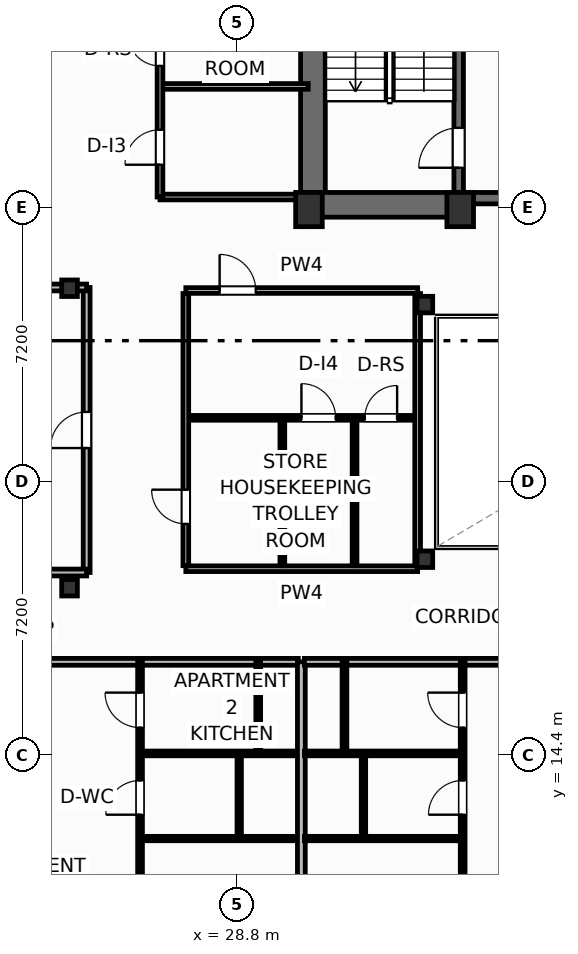
"""IFC4 building model, lengths in metres.
Left out: names, types, materials, properties, quantities, classifications, styles, units other than length and angle.
Written with IfcOpenShell. Run it as: python <this file> out.ifc"""

import sys

from ifc_helpers import new_model, si_unit, direction, frame, frame_2d, origin, origin_2d, place, context, subcontext, project, spatial, rectangle, i_section, extrude, element, fill, save


model = new_model("IFC4")
c1 = context("Model", 3, precision=1e-05, world=origin(), true_north=direction((0.0, 1.0)))
c2 = subcontext(c1, "Body", "Model", "MODEL_VIEW")
j1 = project(units=[si_unit("LENGTHUNIT", "METRE"), si_unit("PLANEANGLEUNIT", "RADIAN")], contexts=[c1])
p1 = place(None, origin())
s1 = spatial("IfcSite", under=j1, at=p1, CompositionType="ELEMENT")
p2 = place(p1, origin())
s2 = spatial("IfcBuilding", under=s1, at=p2, CompositionType="ELEMENT")
p3 = place(p2, frame((0.0, 0.0, 220.1)))
s3 = spatial("IfcBuildingStorey", under=s2, at=p3, CompositionType="ELEMENT", Elevation=220.1)
for number, where, z_axis, x_axis in (
    (1, (30.7, 28.75, 0.0), (0.0, 0.0, 1.0), (1.0, 0.0, 0.0)),
    (2, (34.68, 28.75, 0.0), (0.0, 0.0, 1.0), (1.0, 0.0, 0.0)),
):
    element("IfcColumn", number, at=place(p3, frame(where, z_axis=z_axis, x_axis=x_axis)), inside=s3, PredefinedType="COLUMN", context=c2, shape_type="SweptSolid", body=[
        extrude(rectangle(XDim=0.7, YDim=0.9, at=origin_2d()), origin(), (0.0, 0.0, 1.0), 3.7),
    ])
for number, where, z_axis, x_axis in (
    (3, (33.75, 19.55, 0.0), (0.0, 0.0, 1.0), (1.0, 0.0, 0.0)),
    (4, (33.75, 26.25, 0.0), (0.0, 0.0, 1.0), (1.0, 0.0, 0.0)),
    (5, (24.4, 18.8, 0.0), (0.0, 0.0, 1.0), (1.0, 0.0, 0.0)),
    (6, (24.4, 26.68, 0.0), (0.0, 0.0, 1.0), (1.0, 0.0, 0.0)),
):
    element("IfcColumn", number, at=place(p3, frame(where, z_axis=z_axis, x_axis=x_axis)), inside=s3, PredefinedType="COLUMN", context=c2, shape_type="SweptSolid", body=[
        extrude(i_section(OverallWidth=0.412, OverallDepth=0.435, WebThickness=0.036, FlangeThickness=0.057, FilletRadius=0.025, at=origin_2d()), origin(), (0.0, 0.0, 1.0), 3.7),
    ])
p4 = place(p3, frame((30.805, 29.2, 0.0), z_axis=(0.0, 0.0, 1.0), x_axis=(0.0, 1.0, 0.0)))
e7 = element("IfcWall", 7, at=p4, inside=s3, PredefinedType="SHEAR", context=c2, shape_type="SweptSolid", body=[
    extrude(rectangle(XDim=9.22, YDim=0.65, at=frame_2d((4.61, 0.0))), origin(), (0.0, 0.0, 1.0), 3.45),
])
p5 = place(p3, frame((30.48, 28.875, 0.0), z_axis=(0.0, 0.0, 1.0), x_axis=(1.0, 0.0, 0.0)))
e8 = element("IfcWall", 8, at=p5, inside=s3, PredefinedType="SHEAR", context=c2, shape_type="SweptSolid", body=[
    extrude(rectangle(XDim=4.32, YDim=0.65, at=frame_2d((2.16, 0.0))), origin(), (0.0, 0.0, 1.0), 3.45),
])
p6 = place(p3, frame((34.8, 29.05, 0.0), z_axis=(0.0, 0.0, 1.0), x_axis=(1.0, 0.0, 0.0)))
e9 = element("IfcWall", 9, at=p6, inside=s3, PredefinedType="SHEAR", context=c2, shape_type="SweptSolid", body=[
    extrude(rectangle(XDim=8.8, YDim=0.3, at=frame_2d((4.4, 0.0))), origin(), (0.0, 0.0, 1.0), 3.45),
])
p7 = place(p6, frame((0.95, 0.0, 0.0)))
e10 = element("IfcOpeningElement", 10, at=p7, cuts=e9, PredefinedType="OPENING", context=c2, shape_type="SweptSolid", body=[
    extrude(rectangle(XDim=1.1, YDim=2.15, at=frame_2d((0.55, 1.075))), frame((0.0, 0.16, 0.0), z_axis=(0.0, -1.0, 0.0), x_axis=(1.0, 0.0, 0.0)), (0.0, 0.0, 1.0), 0.32),
])
p8 = place(p6, frame((6.75, 0.0, 0.0)))
e11 = element("IfcOpeningElement", 11, at=p8, cuts=e9, PredefinedType="OPENING", context=c2, shape_type="SweptSolid", body=[
    extrude(rectangle(XDim=1.1, YDim=2.15, at=frame_2d((0.55, 1.075))), frame((0.0, 0.16, 0.0), z_axis=(0.0, -1.0, 0.0), x_axis=(1.0, 0.0, 0.0)), (0.0, 0.0, 1.0), 0.32),
])
p9 = place(p6, frame((4.45, 0.0, 0.0)))
e12 = element("IfcOpeningElement", 12, at=p9, cuts=e9, PredefinedType="OPENING", context=c2, shape_type="SweptSolid", body=[
    extrude(rectangle(XDim=0.95, YDim=2.15, at=frame_2d((0.475, 1.075))), frame((0.0, 0.16, 0.0), z_axis=(0.0, -1.0, 0.0), x_axis=(1.0, 0.0, 0.0)), (0.0, 0.0, 1.0), 0.32),
])
p10 = place(p3, frame((34.64, 29.2, 0.0), z_axis=(0.0, 0.0, 1.0), x_axis=(0.0, 1.0, 0.0)))
e13 = element("IfcWall", 13, at=p10, inside=s3, PredefinedType="SHEAR", context=c2, shape_type="SweptSolid", body=[
    extrude(rectangle(XDim=9.22, YDim=0.25, at=frame_2d((4.61, 0.0))), origin(), (0.0, 0.0, 1.0), 3.45),
])
p11 = place(p10, frame((0.65, 0.0, 0.0)))
e14 = element("IfcOpeningElement", 14, at=p11, cuts=e13, PredefinedType="OPENING", context=c2, shape_type="SweptSolid", body=[
    extrude(rectangle(XDim=1.05, YDim=2.15, at=frame_2d((0.525, 1.075))), frame((0.0, 0.135, 0.0), z_axis=(0.0, -1.0, 0.0), x_axis=(1.0, 0.0, 0.0)), (0.0, 0.0, 1.0), 0.27),
])
p12 = place(p3, frame((20.58, 16.85, 0.0), z_axis=(0.0, 0.0, 1.0), x_axis=(1.0, 0.0, 0.0)))
e15 = element("IfcWall", 15, at=p12, inside=s3, PredefinedType="PARTITIONING", context=c2, shape_type="SweptSolid", body=[
    extrude(rectangle(XDim=9.84, YDim=0.18, at=frame_2d((4.92, 0.0))), origin(), (0.0, 0.0, 1.0), 3.45),
])
p13 = place(p12, frame((2.302, 0.0, 0.0)))
e16 = element("IfcOpeningElement", 16, at=p13, cuts=e15, PredefinedType="OPENING", context=c2, shape_type="SweptSolid", body=[
    extrude(rectangle(XDim=1.0, YDim=2.2, at=frame_2d((0.5, 1.1))), frame((0.0, 0.1, 0.0), z_axis=(0.0, -1.0, 0.0), x_axis=(1.0, 0.0, 0.0)), (0.0, 0.0, 1.0), 0.2),
])
p14 = place(p3, frame((26.255, -1.478, 0.0), z_axis=(0.0, 0.0, 1.0), x_axis=(0.0, 1.0, 0.0)))
e17 = element("IfcWall", 17, at=p14, inside=s3, PredefinedType="PARTITIONING", context=c2, shape_type="SweptSolid", body=[
    extrude(rectangle(XDim=18.328, YDim=0.125, at=frame_2d((9.164, 0.0))), origin(), (0.0, 0.0, 1.0), 2.739),
])
p15 = place(p14, frame((6.319, 0.0, 0.0)))
e18 = element("IfcOpeningElement", 18, at=p15, cuts=e17, PredefinedType="OPENING", context=c2, shape_type="SweptSolid", body=[
    extrude(rectangle(XDim=0.92, YDim=2.05, at=frame_2d((0.46, 1.025))), frame((0.0, 0.073, 0.0), z_axis=(0.0, -1.0, 0.0), x_axis=(1.0, 0.0, 0.0)), (0.0, 0.0, 1.0), 0.145),
])
p16 = place(p14, frame((14.305, 0.0, 0.0)))
e19 = element("IfcOpeningElement", 19, at=p16, cuts=e17, PredefinedType="OPENING", context=c2, shape_type="SweptSolid", body=[
    extrude(rectangle(XDim=0.9, YDim=2.05, at=frame_2d((0.45, 1.025))), frame((0.0, 0.073, 0.0), z_axis=(0.0, -1.0, 0.0), x_axis=(1.0, 0.0, 0.0)), (0.0, 0.0, 1.0), 0.145),
])
p17 = place(p14, frame((16.598, 0.0, 0.0)))
e20 = element("IfcOpeningElement", 20, at=p17, cuts=e17, PredefinedType="OPENING", context=c2, shape_type="SweptSolid", body=[
    extrude(rectangle(XDim=0.92, YDim=2.05, at=frame_2d((0.46, 1.025))), frame((0.0, 0.073, 0.0), z_axis=(0.0, -1.0, 0.0), x_axis=(1.0, 0.0, 0.0)), (0.0, 0.0, 1.0), 0.145),
])
p18 = place(p3, frame((26.325, 14.44, 0.0), z_axis=(0.0, 0.0, 1.0), x_axis=(1.0, 0.0, 0.0)))
e21 = element("IfcWall", 21, at=p18, inside=s3, PredefinedType="PARTITIONING", context=c2, shape_type="SweptSolid", body=[
    extrude(rectangle(XDim=4.095, YDim=0.125, at=frame_2d((2.047, 0.0))), origin(), (0.0, 0.0, 1.0), 3.45),
])
p19 = place(p3, frame((26.325, 12.2, 0.0), z_axis=(0.0, 0.0, 1.0), x_axis=(1.0, 0.0, 0.0)))
e22 = element("IfcWall", 22, at=p19, inside=s3, PredefinedType="PARTITIONING", context=c2, shape_type="SweptSolid", body=[
    extrude(rectangle(XDim=4.095, YDim=0.115, at=frame_2d((2.047, 0.0))), origin(), (0.0, 0.0, 1.0), 3.45),
])
p20 = place(p3, frame((29.365, 14.44, 0.0), z_axis=(0.0, 0.0, 1.0), x_axis=(0.0, 1.0, 0.0)))
e23 = element("IfcWall", 23, at=p20, inside=s3, PredefinedType="PARTITIONING", context=c2, shape_type="SweptSolid", body=[
    extrude(rectangle(XDim=2.41, YDim=0.125, at=frame_2d((1.205, 0.0))), origin(), (0.0, 0.0, 1.0), 3.45),
])
p21 = place(p3, frame((28.865, 12.2, 0.0), z_axis=(0.0, 0.0, 1.0), x_axis=(0.0, 1.0, 0.0)))
e24 = element("IfcWall", 24, at=p21, inside=s3, PredefinedType="PARTITIONING", context=c2, shape_type="SweptSolid", body=[
    extrude(rectangle(XDim=2.24, YDim=0.115, at=frame_2d((1.12, 0.0))), origin(), (0.0, 0.0, 1.0), 3.45),
])
p22 = place(p3, frame((30.5, 0.129, 0.0), z_axis=(0.0, 0.0, 1.0), x_axis=(0.0, 1.0, 0.0)))
e25 = element("IfcWall", 25, at=p22, inside=s3, PredefinedType="PARTITIONING", context=c2, shape_type="SweptSolid", body=[
    extrude(rectangle(XDim=16.721, YDim=0.205, at=frame_2d((8.36, 0.0))), origin(), (0.0, 0.0, 1.0), 3.45),
])
p23 = place(p3, frame((30.58, 16.85, 0.0), z_axis=(0.0, 0.0, 1.0), x_axis=(1.0, 0.0, 0.0)))
e26 = element("IfcWall", 26, at=p23, inside=s3, PredefinedType="PARTITIONING", context=c2, shape_type="SweptSolid", body=[
    extrude(rectangle(XDim=9.84, YDim=0.18, at=frame_2d((4.92, 0.0))), origin(), (0.0, 0.0, 1.0), 3.45),
])
p24 = place(p23, frame((6.537, 0.0, 0.0)))
e27 = element("IfcOpeningElement", 27, at=p24, cuts=e26, PredefinedType="OPENING", context=c2, shape_type="SweptSolid", body=[
    extrude(rectangle(XDim=1.0, YDim=2.2, at=frame_2d((0.5, 1.1))), frame((0.0, 0.1, 0.0), z_axis=(0.0, -1.0, 0.0), x_axis=(1.0, 0.0, 0.0)), (0.0, 0.0, 1.0), 0.2),
])
p25 = place(p3, frame((34.745, 1.736, 0.0), z_axis=(0.0, 0.0, 1.0), x_axis=(0.0, 1.0, 0.0)))
e28 = element("IfcWall", 28, at=p25, inside=s3, PredefinedType="PARTITIONING", context=c2, shape_type="SweptSolid", body=[
    extrude(rectangle(XDim=15.114, YDim=0.125, at=frame_2d((7.557, 0.0))), origin(), (0.0, 0.0, 1.0), 2.739),
])
p26 = place(p25, frame((4.712, 0.0, 0.0)))
e29 = element("IfcOpeningElement", 29, at=p26, cuts=e28, PredefinedType="OPENING", context=c2, shape_type="SweptSolid", body=[
    extrude(rectangle(XDim=0.92, YDim=2.05, at=frame_2d((0.46, 1.025))), frame((0.0, 0.073, 0.0), z_axis=(0.0, -1.0, 0.0), x_axis=(1.0, 0.0, 0.0)), (0.0, 0.0, 1.0), 0.145),
])
p27 = place(p25, frame((11.091, 0.0, 0.0)))
e30 = element("IfcOpeningElement", 30, at=p27, cuts=e28, PredefinedType="OPENING", context=c2, shape_type="SweptSolid", body=[
    extrude(rectangle(XDim=0.9, YDim=2.05, at=frame_2d((0.45, 1.025))), frame((0.0, 0.073, 0.0), z_axis=(0.0, -1.0, 0.0), x_axis=(1.0, 0.0, 0.0)), (0.0, 0.0, 1.0), 0.145),
])
p28 = place(p25, frame((13.384, 0.0, 0.0)))
e31 = element("IfcOpeningElement", 31, at=p28, cuts=e28, PredefinedType="OPENING", context=c2, shape_type="SweptSolid", body=[
    extrude(rectangle(XDim=0.92, YDim=2.05, at=frame_2d((0.46, 1.025))), frame((0.0, 0.073, 0.0), z_axis=(0.0, -1.0, 0.0), x_axis=(1.0, 0.0, 0.0)), (0.0, 0.0, 1.0), 0.145),
])
p29 = place(p3, frame((30.58, 14.44, 0.0), z_axis=(0.0, 0.0, 1.0), x_axis=(1.0, 0.0, 0.0)))
e32 = element("IfcWall", 32, at=p29, inside=s3, PredefinedType="PARTITIONING", context=c2, shape_type="SweptSolid", body=[
    extrude(rectangle(XDim=4.095, YDim=0.125, at=frame_2d((2.047, 0.0))), origin(), (0.0, 0.0, 1.0), 3.45),
])
p30 = place(p3, frame((30.58, 12.2, 0.0), z_axis=(0.0, 0.0, 1.0), x_axis=(1.0, 0.0, 0.0)))
e33 = element("IfcWall", 33, at=p30, inside=s3, PredefinedType="PARTITIONING", context=c2, shape_type="SweptSolid", body=[
    extrude(rectangle(XDim=4.095, YDim=0.115, at=frame_2d((2.047, 0.0))), origin(), (0.0, 0.0, 1.0), 3.45),
])
p31 = place(p3, frame((31.635, 14.44, 0.0), z_axis=(0.0, 0.0, 1.0), x_axis=(0.0, 1.0, 0.0)))
e34 = element("IfcWall", 34, at=p31, inside=s3, PredefinedType="PARTITIONING", context=c2, shape_type="SweptSolid", body=[
    extrude(rectangle(XDim=2.41, YDim=0.125, at=frame_2d((1.205, 0.0))), origin(), (0.0, 0.0, 1.0), 3.45),
])
p32 = place(p3, frame((32.135, 12.2, 0.0), z_axis=(0.0, 0.0, 1.0), x_axis=(0.0, 1.0, 0.0)))
e35 = element("IfcWall", 35, at=p32, inside=s3, PredefinedType="PARTITIONING", context=c2, shape_type="SweptSolid", body=[
    extrude(rectangle(XDim=2.24, YDim=0.115, at=frame_2d((1.12, 0.0))), origin(), (0.0, 0.0, 1.0), 3.45),
])
p33 = place(p3, frame((24.85, 19.2, 0.0), z_axis=(0.0, 0.0, 1.0), x_axis=(0.0, 1.0, 0.0)))
e36 = element("IfcWall", 36, at=p33, inside=s3, PredefinedType="PARTITIONING", context=c2, shape_type="SweptSolid", body=[
    extrude(rectangle(XDim=7.5, YDim=0.18, at=frame_2d((3.75, 0.0))), origin(), (0.0, 0.0, 1.0), 3.45),
])
p34 = place(p33, frame((3.275, 0.0, 0.0)))
e37 = element("IfcOpeningElement", 37, at=p34, cuts=e36, PredefinedType="OPENING", context=c2, shape_type="SweptSolid", body=[
    extrude(rectangle(XDim=0.95, YDim=2.05, at=frame_2d((0.475, 1.025))), frame((0.0, 0.1, 0.0), z_axis=(0.0, -1.0, 0.0), x_axis=(1.0, 0.0, 0.0)), (0.0, 0.0, 1.0), 0.2),
])
p35 = place(p3, frame((6.306, 19.2, 0.0), z_axis=(0.0, 0.0, 1.0), x_axis=(1.0, 0.0, 0.0)))
e38 = element("IfcWall", 38, at=p35, inside=s3, PredefinedType="PARTITIONING", context=c2, shape_type="SweptSolid", body=[
    extrude(rectangle(XDim=18.544, YDim=0.18, at=frame_2d((9.272, 0.0))), origin(), (0.0, 0.0, 1.0), 3.45),
])
p36 = place(p3, frame((3.467, 26.7, 0.0), z_axis=(0.0, 0.0, 1.0), x_axis=(1.0, 0.0, 0.0)))
e39 = element("IfcWall", 39, at=p36, inside=s3, PredefinedType="PARTITIONING", context=c2, shape_type="SweptSolid", body=[
    extrude(rectangle(XDim=21.383, YDim=0.18, at=frame_2d((10.691, 0.0))), origin(), (0.0, 0.0, 1.0), 2.662),
])
p37 = place(p3, frame((27.46, 26.62, 0.0), z_axis=(0.0, 0.0, 1.0), x_axis=(1.0, 0.0, 0.0)))
e40 = element("IfcWall", 40, at=p37, inside=s3, PredefinedType="PARTITIONING", context=c2, shape_type="SweptSolid", body=[
    extrude(rectangle(XDim=6.1, YDim=0.15, at=frame_2d((3.05, 0.0))), origin(), (0.0, 0.0, 1.0), 2.662),
])
p38 = place(p37, frame((0.89, 0.0, 0.0)))
e41 = element("IfcOpeningElement", 41, at=p38, cuts=e40, PredefinedType="OPENING", context=c2, shape_type="SweptSolid", body=[
    extrude(rectangle(XDim=0.95, YDim=2.05, at=frame_2d((0.475, 1.025))), frame((0.0, 0.085, 0.0), z_axis=(0.0, -1.0, 0.0), x_axis=(1.0, 0.0, 0.0)), (0.0, 0.0, 1.0), 0.17),
])
p39 = place(p3, frame((27.46, 19.3, 0.0), z_axis=(0.0, 0.0, 1.0), x_axis=(1.0, 0.0, 0.0)))
e42 = element("IfcWall", 42, at=p39, inside=s3, PredefinedType="PARTITIONING", context=c2, shape_type="SweptSolid", body=[
    extrude(rectangle(XDim=6.1, YDim=0.15, at=frame_2d((3.05, 0.0))), origin(), (0.0, 0.0, 1.0), 2.662),
])
p40 = place(p3, frame((27.52, 23.27, 0.0), z_axis=(0.0, 0.0, 1.0), x_axis=(1.0, 0.0, 0.0)))
e43 = element("IfcWall", 43, at=p40, inside=s3, PredefinedType="PARTITIONING", context=c2, shape_type="SweptSolid", body=[
    extrude(rectangle(XDim=6.0, YDim=0.125, at=frame_2d((3.0, 0.0))), origin(), (0.0, 0.0, 1.0), 3.45),
])
p41 = place(p40, frame((2.982, 0.0, 0.0)))
e44 = element("IfcOpeningElement", 44, at=p41, cuts=e43, PredefinedType="OPENING", context=c2, shape_type="SweptSolid", body=[
    extrude(rectangle(XDim=0.9, YDim=2.05, at=frame_2d((0.45, 1.025))), frame((0.0, 0.073, 0.0), z_axis=(0.0, -1.0, 0.0), x_axis=(1.0, 0.0, 0.0)), (0.0, 0.0, 1.0), 0.145),
])
p42 = place(p40, frame((4.65, 0.0, 0.0)))
e45 = element("IfcOpeningElement", 45, at=p42, cuts=e43, PredefinedType="OPENING", context=c2, shape_type="SweptSolid", body=[
    extrude(rectangle(XDim=0.85, YDim=2.05, at=frame_2d((0.425, 1.025))), frame((0.0, 0.073, 0.0), z_axis=(0.0, -1.0, 0.0), x_axis=(1.0, 0.0, 0.0)), (0.0, 0.0, 1.0), 0.145),
])
for number, where, z_axis, x_axis in (
    (46, (30.0, 19.38, 0.0), (0.0, 0.0, 1.0), (0.0, 1.0, 0.0)),
    (47, (31.9, 19.38, 0.0), (0.0, 0.0, 1.0), (0.0, 1.0, 0.0)),
):
    element("IfcWall", number, at=place(p3, frame(where, z_axis=z_axis, x_axis=x_axis)), inside=s3, PredefinedType="PARTITIONING", context=c2, shape_type="SweptSolid", body=[
        extrude(rectangle(XDim=3.82, YDim=0.125, at=frame_2d((1.91, 0.0))), origin(), (0.0, 0.0, 1.0), 3.45),
    ])
p43 = place(p3, frame((27.46, 19.38, 0.0), z_axis=(0.0, 0.0, 1.0), x_axis=(0.0, 1.0, 0.0)))
e48 = element("IfcWall", 48, at=p43, inside=s3, PredefinedType="PARTITIONING", context=c2, shape_type="SweptSolid", body=[
    extrude(rectangle(XDim=7.16, YDim=0.15, at=frame_2d((3.58, 0.0))), origin(), (0.0, 0.0, 1.0), 3.45),
])
p44 = place(p43, frame((1.1, 0.0, 0.0)))
e49 = element("IfcOpeningElement", 49, at=p44, cuts=e48, PredefinedType="OPENING", context=c2, shape_type="SweptSolid", body=[
    extrude(rectangle(XDim=0.9, YDim=2.05, at=frame_2d((0.45, 1.025))), frame((0.0, 0.085, 0.0), z_axis=(0.0, -1.0, 0.0), x_axis=(1.0, 0.0, 0.0)), (0.0, 0.0, 1.0), 0.17),
])
p45 = place(p3, frame((33.56, 19.38, 0.0), z_axis=(0.0, 0.0, 1.0), x_axis=(0.0, 1.0, 0.0)))
e50 = element("IfcWall", 50, at=p45, inside=s3, PredefinedType="PARTITIONING", context=c2, shape_type="SweptSolid", body=[
    extrude(rectangle(XDim=7.16, YDim=0.15, at=frame_2d((3.58, 0.0))), origin(), (0.0, 0.0, 1.0), 2.824),
])
p46 = place(p3, frame((26.78, 29.08, 0.0), z_axis=(0.0, 0.0, 1.0), x_axis=(1.0, 0.0, 0.0)))
e51 = element("IfcWall", 51, at=p46, inside=s3, PredefinedType="PARTITIONING", context=c2, shape_type="SweptSolid", body=[
    extrude(rectangle(XDim=3.7, YDim=0.15, at=frame_2d((1.85, 0.0))), origin(), (0.0, 0.0, 1.0), 3.45),
])
p47 = place(p3, frame((26.8, 31.99, 0.0), z_axis=(0.0, 0.0, 1.0), x_axis=(1.0, 0.0, 0.0)))
e52 = element("IfcWall", 52, at=p47, inside=s3, PredefinedType="PARTITIONING", context=c2, shape_type="SweptSolid", body=[
    extrude(rectangle(XDim=3.88, YDim=0.15, at=frame_2d((1.94, 0.0))), origin(), (0.0, 0.0, 1.0), 3.45),
])
p48 = place(p3, frame((26.78, 29.08, 0.0), z_axis=(0.0, 0.0, 1.0), x_axis=(0.0, 1.0, 0.0)))
e53 = element("IfcWall", 53, at=p48, inside=s3, PredefinedType="PARTITIONING", context=c2, shape_type="SweptSolid", body=[
    extrude(rectangle(XDim=5.87, YDim=0.15, at=frame_2d((2.935, 0.0))), origin(), (0.0, 0.0, 1.0), 3.45),
])
p49 = place(p48, frame((0.85, 0.0, 0.0)))
e54 = element("IfcOpeningElement", 54, at=p49, cuts=e53, PredefinedType="OPENING", context=c2, shape_type="SweptSolid", body=[
    extrude(rectangle(XDim=0.92, YDim=2.05, at=frame_2d((0.46, 1.025))), frame((0.0, 0.085, 0.0), z_axis=(0.0, -1.0, 0.0), x_axis=(1.0, 0.0, 0.0)), (0.0, 0.0, 1.0), 0.17),
])
p50 = place(p48, frame((3.45, 0.0, 0.0)))
e55 = element("IfcOpeningElement", 55, at=p50, cuts=e53, PredefinedType="OPENING", context=c2, shape_type="SweptSolid", body=[
    extrude(rectangle(XDim=0.85, YDim=2.05, at=frame_2d((0.425, 1.025))), frame((0.0, 0.085, 0.0), z_axis=(0.0, -1.0, 0.0), x_axis=(1.0, 0.0, 0.0)), (0.0, 0.0, 1.0), 0.17),
])
p51 = place(p16, origin())
e56 = element("IfcDoor", 56, at=p51, inside=s3, OperationType="SINGLE_SWING_LEFT", PredefinedType="DOOR", context=c2, shape_type="SweptSolid", body=[
    extrude(rectangle(XDim=0.9, YDim=2.05, at=frame_2d((0.45, 1.025))), frame((0.0, 0.025, 0.0), z_axis=(0.0, -1.0, 0.0), x_axis=(1.0, 0.0, 0.0)), (0.0, 0.0, 1.0), 0.05),
])
fill(e19, e56)
p52 = place(p17, origin())
e57 = element("IfcDoor", 57, at=p52, inside=s3, OperationType="SINGLE_SWING_RIGHT", PredefinedType="DOOR", context=c2, shape_type="SweptSolid", body=[
    extrude(rectangle(XDim=0.92, YDim=2.05, at=frame_2d((0.46, 1.025))), frame((0.0, 0.025, 0.0), z_axis=(0.0, -1.0, 0.0), x_axis=(1.0, 0.0, 0.0)), (0.0, 0.0, 1.0), 0.05),
])
fill(e20, e57)
p53 = place(p27, origin())
e58 = element("IfcDoor", 58, at=p53, inside=s3, OperationType="SINGLE_SWING_LEFT", PredefinedType="DOOR", context=c2, shape_type="SweptSolid", body=[
    extrude(rectangle(XDim=0.9, YDim=2.05, at=frame_2d((0.45, 1.025))), frame((0.0, 0.025, 0.0), z_axis=(0.0, -1.0, 0.0), x_axis=(1.0, 0.0, 0.0)), (0.0, 0.0, 1.0), 0.05),
])
fill(e30, e58)
p54 = place(p28, origin())
e59 = element("IfcDoor", 59, at=p54, inside=s3, OperationType="SINGLE_SWING_RIGHT", PredefinedType="DOOR", context=c2, shape_type="SweptSolid", body=[
    extrude(rectangle(XDim=0.92, YDim=2.05, at=frame_2d((0.46, 1.025))), frame((0.0, 0.025, 0.0), z_axis=(0.0, -1.0, 0.0), x_axis=(1.0, 0.0, 0.0)), (0.0, 0.0, 1.0), 0.05),
])
fill(e31, e59)
p55 = place(p34, origin())
e60 = element("IfcDoor", 60, at=p55, inside=s3, OperationType="SINGLE_SWING_LEFT", PredefinedType="DOOR", context=c2, shape_type="SweptSolid", body=[
    extrude(rectangle(XDim=0.95, YDim=2.05, at=frame_2d((0.475, 1.025))), frame((0.0, 0.025, 0.0), z_axis=(0.0, -1.0, 0.0), x_axis=(1.0, 0.0, 0.0)), (0.0, 0.0, 1.0), 0.05),
])
fill(e37, e60)
p56 = place(p11, origin())
e61 = element("IfcDoor", 61, at=p56, inside=s3, OperationType="SINGLE_SWING_LEFT", PredefinedType="DOOR", context=c2, shape_type="SweptSolid", body=[
    extrude(rectangle(XDim=1.05, YDim=2.15, at=frame_2d((0.525, 1.075))), frame((0.0, 0.025, 0.0), z_axis=(0.0, -1.0, 0.0), x_axis=(1.0, 0.0, 0.0)), (0.0, 0.0, 1.0), 0.05),
])
fill(e14, e61)
p57 = place(p38, origin())
e62 = element("IfcDoor", 62, at=p57, inside=s3, OperationType="SINGLE_SWING_LEFT", PredefinedType="DOOR", context=c2, shape_type="SweptSolid", body=[
    extrude(rectangle(XDim=0.95, YDim=2.05, at=frame_2d((0.475, 1.025))), frame((0.0, 0.025, 0.0), z_axis=(0.0, -1.0, 0.0), x_axis=(1.0, 0.0, 0.0)), (0.0, 0.0, 1.0), 0.05),
])
fill(e41, e62)
p58 = place(p41, origin())
e63 = element("IfcDoor", 63, at=p58, inside=s3, OperationType="SINGLE_SWING_LEFT", PredefinedType="DOOR", context=c2, shape_type="SweptSolid", body=[
    extrude(rectangle(XDim=0.9, YDim=2.05, at=frame_2d((0.45, 1.025))), frame((0.0, 0.025, 0.0), z_axis=(0.0, -1.0, 0.0), x_axis=(1.0, 0.0, 0.0)), (0.0, 0.0, 1.0), 0.05),
])
fill(e44, e63)
p59 = place(p42, origin())
e64 = element("IfcDoor", 64, at=p59, inside=s3, OperationType="SINGLE_SWING_RIGHT", PredefinedType="DOOR", context=c2, shape_type="SweptSolid", body=[
    extrude(rectangle(XDim=0.85, YDim=2.05, at=frame_2d((0.425, 1.025))), frame((0.0, 0.025, 0.0), z_axis=(0.0, -1.0, 0.0), x_axis=(1.0, 0.0, 0.0)), (0.0, 0.0, 1.0), 0.05),
])
fill(e45, e64)
p60 = place(p44, origin())
e65 = element("IfcDoor", 65, at=p60, inside=s3, OperationType="SINGLE_SWING_RIGHT", PredefinedType="DOOR", context=c2, shape_type="SweptSolid", body=[
    extrude(rectangle(XDim=0.9, YDim=2.05, at=frame_2d((0.45, 1.025))), frame((0.0, 0.025, 0.0), z_axis=(0.0, -1.0, 0.0), x_axis=(1.0, 0.0, 0.0)), (0.0, 0.0, 1.0), 0.05),
])
fill(e49, e65)
p61 = place(p49, origin())
e66 = element("IfcDoor", 66, at=p61, inside=s3, OperationType="SINGLE_SWING_LEFT", PredefinedType="DOOR", context=c2, shape_type="SweptSolid", body=[
    extrude(rectangle(XDim=0.92, YDim=2.05, at=frame_2d((0.46, 1.025))), frame((0.0, 0.025, 0.0), z_axis=(0.0, -1.0, 0.0), x_axis=(1.0, 0.0, 0.0)), (0.0, 0.0, 1.0), 0.05),
])
fill(e54, e66)
p62 = place(p50, origin())
e67 = element("IfcDoor", 67, at=p62, inside=s3, OperationType="SINGLE_SWING_RIGHT", PredefinedType="DOOR", context=c2, shape_type="SweptSolid", body=[
    extrude(rectangle(XDim=0.85, YDim=2.05, at=frame_2d((0.425, 1.025))), frame((0.0, 0.025, 0.0), z_axis=(0.0, -1.0, 0.0), x_axis=(1.0, 0.0, 0.0)), (0.0, 0.0, 1.0), 0.05),
])
fill(e55, e67)
save(model, sys.argv[1])
